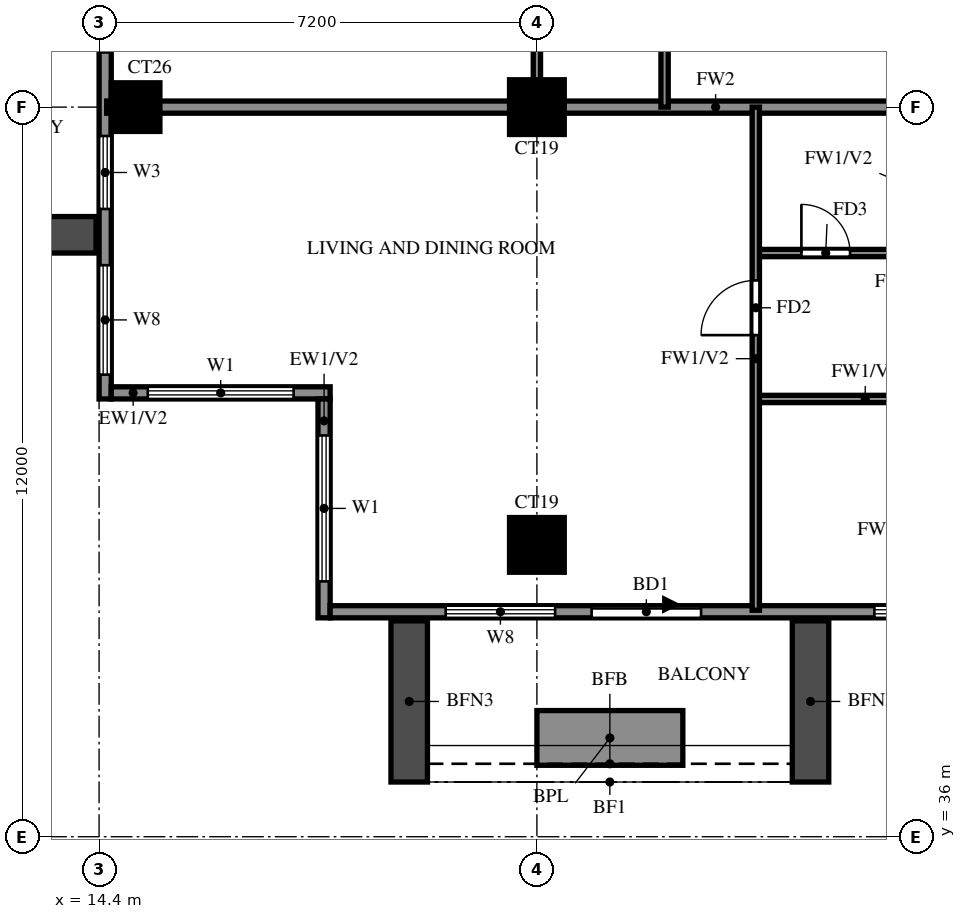
"""IFC4 building model, lengths in metres.
Left out: names, types, materials, properties, quantities, classifications, styles, units other than length and angle.
Written with IfcOpenShell. Run it as: python <this file> out.ifc"""

import sys

from ifc_helpers import new_model, si_unit, direction, frame, frame_2d, origin, origin_2d, place, context, subcontext, project, spatial, rectangle, extrude, source, transform, mapped, element, fill, save


model = new_model("IFC4")
c1 = context("Model", 3, precision=1e-05, world=origin(), true_north=direction((0.0, 1.0)))
c2 = subcontext(c1, "Body", "Model", "MODEL_VIEW")
j1 = project(units=[si_unit("LENGTHUNIT", "METRE"), si_unit("PLANEANGLEUNIT", "RADIAN")], contexts=[c1])
p1 = place(None, origin())
s1 = spatial("IfcSite", under=j1, at=p1, CompositionType="ELEMENT")
p2 = place(p1, origin())
s2 = spatial("IfcBuilding", under=s1, at=p2, CompositionType="ELEMENT")
p3 = place(p2, frame((0.0, 0.0, 192.0)))
s3 = spatial("IfcBuildingStorey", under=s2, at=p3, CompositionType="ELEMENT", Elevation=192.0)
m1 = source(origin(), c2, "Body", "SweptSolid", [
    extrude(rectangle(XDim=0.9, YDim=0.9, at=origin_2d()), origin(), (0.0, 0.0, 1.0), 3.2),
])
p4 = place(p3, frame((21.6, 40.8, 0.0), z_axis=(0.0, 0.0, 1.0), x_axis=(1.0, 0.0, 0.0)))
e1 = element("IfcColumn", 1, at=p4, inside=s3, PredefinedType="COLUMN", context=c2, shape_type="MappedRepresentation", body=[
    mapped(m1, transform((0.0, 0.0, 0.0))),
])
m2 = source(origin(), c2, "Body", "SweptSolid", [
    extrude(rectangle(XDim=0.8, YDim=0.8, at=origin_2d()), origin(), (0.0, 0.0, 1.0), 3.2),
])
p5 = place(p3, frame((15.0, 48.0, 0.0), z_axis=(0.0, 0.0, 1.0), x_axis=(1.0, 0.0, 0.0)))
e2 = element("IfcColumn", 2, at=p5, inside=s3, PredefinedType="COLUMN", context=c2, shape_type="MappedRepresentation", body=[
    mapped(m2, transform((0.0, 0.0, 0.0))),
])
p6 = place(p3, frame((21.6, 48.0, 0.0), z_axis=(0.0, 0.0, 1.0), x_axis=(1.0, 0.0, 0.0)))
e3 = element("IfcColumn", 3, at=p6, inside=s3, PredefinedType="COLUMN", context=c2, shape_type="MappedRepresentation", body=[
    mapped(m1, transform((0.0, 0.0, 0.0))),
])
p7 = place(p3, frame((14.5, 76.6, 0.0), z_axis=(0.0, 0.0, 1.0), x_axis=(0.0, -1.0, 0.0)))
e4 = element("IfcWall", 4, at=p7, inside=s3, PredefinedType="SOLIDWALL", context=c2, shape_type="SweptSolid", body=[
    extrude(rectangle(XDim=33.4, YDim=0.2, at=frame_2d((16.7, 0.0))), origin(), (0.0, 0.0, 1.0), 3.2),
])
p8 = place(p7, frame((11.5, 0.0, 0.0)))
e5 = element("IfcOpeningElement", 5, at=p8, cuts=e4, PredefinedType="OPENING", context=c2, shape_type="SweptSolid", body=[
    extrude(rectangle(XDim=1.8, YDim=2.4, at=frame_2d((0.9, 1.2))), frame((0.0, 0.11, 0.0), z_axis=(0.0, -1.0, 0.0), x_axis=(1.0, 0.0, 0.0)), (0.0, 0.0, 1.0), 0.22),
])
p9 = place(p7, frame((25.9, 0.0, 0.0)))
e6 = element("IfcOpeningElement", 6, at=p9, cuts=e4, PredefinedType="OPENING", context=c2, shape_type="SweptSolid", body=[
    extrude(rectangle(XDim=1.8, YDim=2.4, at=frame_2d((0.9, 1.2))), frame((0.0, 0.11, 0.0), z_axis=(0.0, -1.0, 0.0), x_axis=(1.0, 0.0, 0.0)), (0.0, 0.0, 1.0), 0.22),
])
p10 = place(p7, frame((29.075, 0.0, 0.6)))
e7 = element("IfcOpeningElement", 7, at=p10, cuts=e4, PredefinedType="OPENING", context=c2, shape_type="SweptSolid", body=[
    extrude(rectangle(XDim=1.2, YDim=2.4, at=frame_2d((0.6, 1.2))), frame((0.0, 0.11, 0.0), z_axis=(0.0, -1.0, 0.0), x_axis=(1.0, 0.0, 0.0)), (0.0, 0.0, 1.0), 0.22),
])
p11 = place(p7, frame((31.2, 0.0, 0.6)))
e8 = element("IfcOpeningElement", 8, at=p11, cuts=e4, PredefinedType="OPENING", context=c2, shape_type="SweptSolid", body=[
    extrude(rectangle(XDim=1.8, YDim=2.4, at=frame_2d((0.9, 1.2))), frame((0.0, 0.11, 0.0), z_axis=(0.0, -1.0, 0.0), x_axis=(1.0, 0.0, 0.0)), (0.0, 0.0, 1.0), 0.22),
])
p12 = place(p7, frame((21.875, 0.0, 0.6)))
e9 = element("IfcOpeningElement", 9, at=p12, cuts=e4, PredefinedType="OPENING", context=c2, shape_type="SweptSolid", body=[
    extrude(rectangle(XDim=1.8, YDim=2.4, at=frame_2d((0.9, 1.2))), frame((0.0, 0.11, 0.0), z_axis=(0.0, -1.0, 0.0), x_axis=(1.0, 0.0, 0.0)), (0.0, 0.0, 1.0), 0.22),
])
p13 = place(p7, frame((18.225, 0.0, 0.6)))
e10 = element("IfcOpeningElement", 10, at=p13, cuts=e4, PredefinedType="OPENING", context=c2, shape_type="SweptSolid", body=[
    extrude(rectangle(XDim=2.4, YDim=2.4, at=frame_2d((1.2, 1.2))), frame((0.0, 0.11, 0.0), z_axis=(0.0, -1.0, 0.0), x_axis=(1.0, 0.0, 0.0)), (0.0, 0.0, 1.0), 0.22),
])
p14 = place(p7, frame((14.675, 0.0, 0.6)))
e11 = element("IfcOpeningElement", 11, at=p14, cuts=e4, PredefinedType="OPENING", context=c2, shape_type="SweptSolid", body=[
    extrude(rectangle(XDim=1.2, YDim=2.4, at=frame_2d((0.6, 1.2))), frame((0.0, 0.11, 0.0), z_axis=(0.0, -1.0, 0.0), x_axis=(1.0, 0.0, 0.0)), (0.0, 0.0, 1.0), 0.22),
])
p15 = place(p7, frame((16.75, 0.0, 0.6)))
e12 = element("IfcOpeningElement", 12, at=p15, cuts=e4, PredefinedType="OPENING", context=c2, shape_type="SweptSolid", body=[
    extrude(rectangle(XDim=0.9, YDim=2.4, at=frame_2d((0.45, 1.2))), frame((0.0, 0.11, 0.0), z_axis=(0.0, -1.0, 0.0), x_axis=(1.0, 0.0, 0.0)), (0.0, 0.0, 1.0), 0.22),
])
p16 = place(p7, frame((7.475, 0.0, 0.6)))
e13 = element("IfcOpeningElement", 13, at=p16, cuts=e4, PredefinedType="OPENING", context=c2, shape_type="SweptSolid", body=[
    extrude(rectangle(XDim=1.8, YDim=2.4, at=frame_2d((0.9, 1.2))), frame((0.0, 0.11, 0.0), z_axis=(0.0, -1.0, 0.0), x_axis=(1.0, 0.0, 0.0)), (0.0, 0.0, 1.0), 0.22),
])
p17 = place(p7, frame((3.825, 0.0, 0.6)))
e14 = element("IfcOpeningElement", 14, at=p17, cuts=e4, PredefinedType="OPENING", context=c2, shape_type="SweptSolid", body=[
    extrude(rectangle(XDim=2.4, YDim=2.4, at=frame_2d((1.2, 1.2))), frame((0.0, 0.11, 0.0), z_axis=(0.0, -1.0, 0.0), x_axis=(1.0, 0.0, 0.0)), (0.0, 0.0, 1.0), 0.22),
])
p18 = place(p7, frame((0.6, 0.0, 0.6)))
e15 = element("IfcOpeningElement", 15, at=p18, cuts=e4, PredefinedType="OPENING", context=c2, shape_type="SweptSolid", body=[
    extrude(rectangle(XDim=2.4, YDim=2.4, at=frame_2d((1.2, 1.2))), frame((0.0, 0.11, 0.0), z_axis=(0.0, -1.0, 0.0), x_axis=(1.0, 0.0, 0.0)), (0.0, 0.0, 1.0), 0.22),
])
p19 = place(p3, frame((14.6, 43.3, 0.0), z_axis=(0.0, 0.0, 1.0), x_axis=(1.0, 0.0, 0.0)))
e16 = element("IfcWall", 16, at=p19, inside=s3, PredefinedType="SOLIDWALL", context=c2, shape_type="SweptSolid", body=[
    extrude(rectangle(XDim=3.6, YDim=0.2, at=frame_2d((1.8, 0.0))), origin(), (0.0, 0.0, 1.0), 3.2),
])
p20 = place(p19, frame((0.6, 0.0, 0.6)))
e17 = element("IfcOpeningElement", 17, at=p20, cuts=e16, PredefinedType="OPENING", context=c2, shape_type="SweptSolid", body=[
    extrude(rectangle(XDim=2.4, YDim=2.4, at=frame_2d((1.2, 1.2))), frame((0.0, 0.11, 0.0), z_axis=(0.0, -1.0, 0.0), x_axis=(1.0, 0.0, 0.0)), (0.0, 0.0, 1.0), 0.22),
])
p21 = place(p3, frame((18.1, 43.2, 0.0), z_axis=(0.0, 0.0, 1.0), x_axis=(0.0, -1.0, 0.0)))
e18 = element("IfcWall", 18, at=p21, inside=s3, PredefinedType="SOLIDWALL", context=c2, shape_type="SweptSolid", body=[
    extrude(rectangle(XDim=3.6, YDim=0.2, at=frame_2d((1.8, 0.0))), origin(), (0.0, 0.0, 1.0), 3.2),
])
p22 = place(p21, frame((0.6, 0.0, 0.6)))
e19 = element("IfcOpeningElement", 19, at=p22, cuts=e18, PredefinedType="OPENING", context=c2, shape_type="SweptSolid", body=[
    extrude(rectangle(XDim=2.4, YDim=2.4, at=frame_2d((1.2, 1.2))), frame((0.0, 0.11, 0.0), z_axis=(0.0, -1.0, 0.0), x_axis=(1.0, 0.0, 0.0)), (0.0, 0.0, 1.0), 0.22),
])
p23 = place(p3, frame((18.2, 39.7, 0.0), z_axis=(0.0, 0.0, 1.0), x_axis=(1.0, 0.0, 0.0)))
e20 = element("IfcWall", 20, at=p23, inside=s3, PredefinedType="SOLIDWALL", context=c2, shape_type="SweptSolid", body=[
    extrude(rectangle(XDim=23.8, YDim=0.2, at=frame_2d((11.9, 0.0))), origin(), (0.0, 0.0, 1.0), 3.2),
])
p24 = place(p23, frame((4.3, 0.0, 0.0)))
e21 = element("IfcOpeningElement", 21, at=p24, cuts=e20, PredefinedType="OPENING", context=c2, shape_type="SweptSolid", body=[
    extrude(rectangle(XDim=1.8, YDim=2.4, at=frame_2d((0.9, 1.2))), frame((0.0, 0.11, 0.0), z_axis=(0.0, -1.0, 0.0), x_axis=(1.0, 0.0, 0.0)), (0.0, 0.0, 1.0), 0.22),
])
p25 = place(p23, frame((1.9, 0.0, 0.6)))
e22 = element("IfcOpeningElement", 22, at=p25, cuts=e20, PredefinedType="OPENING", context=c2, shape_type="SweptSolid", body=[
    extrude(rectangle(XDim=1.8, YDim=2.4, at=frame_2d((0.9, 1.2))), frame((0.0, 0.11, 0.0), z_axis=(0.0, -1.0, 0.0), x_axis=(1.0, 0.0, 0.0)), (0.0, 0.0, 1.0), 0.22),
])
p26 = place(p23, frame((11.8, 0.0, 0.6)))
e23 = element("IfcOpeningElement", 23, at=p26, cuts=e20, PredefinedType="OPENING", context=c2, shape_type="SweptSolid", body=[
    extrude(rectangle(XDim=2.4, YDim=2.4, at=frame_2d((1.2, 1.2))), frame((0.0, 0.11, 0.0), z_axis=(0.0, -1.0, 0.0), x_axis=(1.0, 0.0, 0.0)), (0.0, 0.0, 1.0), 0.22),
])
p27 = place(p23, frame((8.95, 0.0, 1.5)))
e24 = element("IfcOpeningElement", 24, at=p27, cuts=e20, PredefinedType="OPENING", context=c2, shape_type="SweptSolid", body=[
    extrude(rectangle(XDim=0.9, YDim=0.9, at=frame_2d((0.45, 0.45))), frame((0.0, 0.11, 0.0), z_axis=(0.0, -1.0, 0.0), x_axis=(1.0, 0.0, 0.0)), (0.0, 0.0, 1.0), 0.22),
])
for number, where, z_axis, x_axis in (
    (25, (14.35, 45.9, 0.0), (0.0, 0.0, 1.0), (-1.0, 0.0, 0.0)),
    (26, (19.5, 39.55, 0.0), (0.0, 0.0, 1.0), (0.0, -1.0, 0.0)),
    (27, (26.1, 39.55, 0.0), (0.0, 0.0, 1.0), (0.0, -1.0, 0.0)),
):
    element("IfcWall", number, at=place(p3, frame(where, z_axis=z_axis, x_axis=x_axis)), inside=s3, PredefinedType="SOLIDWALL", context=c2, shape_type="SweptSolid", body=[
        extrude(rectangle(XDim=2.65, YDim=0.6, at=frame_2d((1.325, 0.0))), origin(), (0.0, 0.0, 1.0), 2.85),
    ])
p28 = place(p3, frame((21.6, 37.625, 0.0), z_axis=(0.0, 0.0, 1.0), x_axis=(1.0, 0.0, 0.0)))
e28 = element("IfcWall", 28, at=p28, inside=s3, PredefinedType="SOLIDWALL", context=c2, shape_type="SweptSolid", body=[
    extrude(rectangle(XDim=2.4, YDim=0.9, at=frame_2d((1.2, 0.0))), origin(), (0.0, 0.0, 1.0), 0.9),
])
p29 = place(p3, frame((14.525, 48.0, 0.0), z_axis=(0.0, 0.0, 1.0), x_axis=(1.0, 0.0, 0.0)))
e29 = element("IfcWall", 29, at=p29, inside=s3, PredefinedType="SOLIDWALL", context=c2, shape_type="SweptSolid", body=[
    extrude(rectangle(XDim=19.075, YDim=0.2, at=frame_2d((9.538, 0.0))), origin(), (0.0, 0.0, 1.0), 3.2),
])
p30 = place(p3, frame((25.2, 43.2, 0.0), z_axis=(0.0, 0.0, 1.0), x_axis=(1.0, 0.0, 0.0)))
e30 = element("IfcWall", 30, at=p30, inside=s3, PredefinedType="PARTITIONING", context=c2, shape_type="SweptSolid", body=[
    extrude(rectangle(XDim=3.6, YDim=0.12, at=frame_2d((1.8, 0.0))), origin(), (0.0, 0.0, 1.0), 3.2),
])
p31 = place(p3, frame((25.2, 45.6, 0.0), z_axis=(0.0, 0.0, 1.0), x_axis=(1.0, 0.0, 0.0)))
e31 = element("IfcWall", 31, at=p31, inside=s3, PredefinedType="PARTITIONING", context=c2, shape_type="SweptSolid", body=[
    extrude(rectangle(XDim=6.0, YDim=0.12, at=frame_2d((3.0, 0.0))), origin(), (0.0, 0.0, 1.0), 3.2),
])
p32 = place(p31, frame((0.75, 0.0, 0.0)))
e32 = element("IfcOpeningElement", 32, at=p32, cuts=e31, PredefinedType="OPENING", context=c2, shape_type="SweptSolid", body=[
    extrude(rectangle(XDim=0.8, YDim=2.1, at=frame_2d((0.4, 1.05))), frame((0.0, 0.07, 0.0), z_axis=(0.0, -1.0, 0.0), x_axis=(1.0, 0.0, 0.0)), (0.0, 0.0, 1.0), 0.14),
])
p33 = place(p31, frame((3.7, 0.0, 0.0)))
e33 = element("IfcOpeningElement", 33, at=p33, cuts=e31, PredefinedType="OPENING", context=c2, shape_type="SweptSolid", body=[
    extrude(rectangle(XDim=0.9, YDim=2.1, at=frame_2d((0.45, 1.05))), frame((0.0, 0.07, 0.0), z_axis=(0.0, -1.0, 0.0), x_axis=(1.0, 0.0, 0.0)), (0.0, 0.0, 1.0), 0.14),
])
p34 = place(p3, frame((21.6, 48.0, 0.0), z_axis=(0.0, 0.0, 1.0), x_axis=(0.0, 1.0, 0.0)))
e34 = element("IfcWall", 34, at=p34, inside=s3, PredefinedType="PARTITIONING", context=c2, shape_type="SweptSolid", body=[
    extrude(rectangle(XDim=25.2, YDim=0.12, at=frame_2d((12.6, 0.0))), origin(), (0.0, 0.0, 1.0), 3.2),
])
p35 = place(p34, frame((1.35, 0.0, 0.0)))
e35 = element("IfcOpeningElement", 35, at=p35, cuts=e34, PredefinedType="OPENING", context=c2, shape_type="SweptSolid", body=[
    extrude(rectangle(XDim=0.9, YDim=2.1, at=frame_2d((0.45, 1.05))), frame((0.0, 0.07, 0.0), z_axis=(0.0, -1.0, 0.0), x_axis=(1.0, 0.0, 0.0)), (0.0, 0.0, 1.0), 0.14),
])
p36 = place(p34, frame((4.95, 0.0, 0.0)))
e36 = element("IfcOpeningElement", 36, at=p36, cuts=e34, PredefinedType="OPENING", context=c2, shape_type="SweptSolid", body=[
    extrude(rectangle(XDim=0.9, YDim=2.1, at=frame_2d((0.45, 1.05))), frame((0.0, 0.07, 0.0), z_axis=(0.0, -1.0, 0.0), x_axis=(1.0, 0.0, 0.0)), (0.0, 0.0, 1.0), 0.14),
])
p37 = place(p34, frame((8.25, 0.0, 0.0)))
e37 = element("IfcOpeningElement", 37, at=p37, cuts=e34, PredefinedType="OPENING", context=c2, shape_type="SweptSolid", body=[
    extrude(rectangle(XDim=1.5, YDim=2.1, at=frame_2d((0.75, 1.05))), frame((0.0, 0.07, 0.0), z_axis=(0.0, -1.0, 0.0), x_axis=(1.0, 0.0, 0.0)), (0.0, 0.0, 1.0), 0.14),
])
p38 = place(p34, frame((12.15, 0.0, 0.0)))
e38 = element("IfcOpeningElement", 38, at=p38, cuts=e34, PredefinedType="OPENING", context=c2, shape_type="SweptSolid", body=[
    extrude(rectangle(XDim=0.9, YDim=2.1, at=frame_2d((0.45, 1.05))), frame((0.0, 0.07, 0.0), z_axis=(0.0, -1.0, 0.0), x_axis=(1.0, 0.0, 0.0)), (0.0, 0.0, 1.0), 0.14),
])
p39 = place(p34, frame((15.75, 0.0, 0.0)))
e39 = element("IfcOpeningElement", 39, at=p39, cuts=e34, PredefinedType="OPENING", context=c2, shape_type="SweptSolid", body=[
    extrude(rectangle(XDim=0.9, YDim=2.1, at=frame_2d((0.45, 1.05))), frame((0.0, 0.07, 0.0), z_axis=(0.0, -1.0, 0.0), x_axis=(1.0, 0.0, 0.0)), (0.0, 0.0, 1.0), 0.14),
])
p40 = place(p34, frame((19.35, 0.0, 0.0)))
e40 = element("IfcOpeningElement", 40, at=p40, cuts=e34, PredefinedType="OPENING", context=c2, shape_type="SweptSolid", body=[
    extrude(rectangle(XDim=0.9, YDim=2.1, at=frame_2d((0.45, 1.05))), frame((0.0, 0.07, 0.0), z_axis=(0.0, -1.0, 0.0), x_axis=(1.0, 0.0, 0.0)), (0.0, 0.0, 1.0), 0.14),
])
p41 = place(p34, frame((22.95, 0.0, 0.0)))
e41 = element("IfcOpeningElement", 41, at=p41, cuts=e34, PredefinedType="OPENING", context=c2, shape_type="SweptSolid", body=[
    extrude(rectangle(XDim=0.9, YDim=2.1, at=frame_2d((0.45, 1.05))), frame((0.0, 0.07, 0.0), z_axis=(0.0, -1.0, 0.0), x_axis=(1.0, 0.0, 0.0)), (0.0, 0.0, 1.0), 0.14),
])
p42 = place(p3, frame((23.7, 48.0, 0.0), z_axis=(0.0, 0.0, 1.0), x_axis=(0.0, 1.0, 0.0)))
e42 = element("IfcWall", 42, at=p42, inside=s3, PredefinedType="PARTITIONING", context=c2, shape_type="SweptSolid", body=[
    extrude(rectangle(XDim=3.6, YDim=0.12, at=frame_2d((1.8, 0.0))), origin(), (0.0, 0.0, 1.0), 3.2),
])
p43 = place(p3, frame((25.2, 39.725, 0.0), z_axis=(0.0, 0.0, 1.0), x_axis=(0.0, 1.0, 0.0)))
e43 = element("IfcWall", 43, at=p43, inside=s3, PredefinedType="PARTITIONING", context=c2, shape_type="SweptSolid", body=[
    extrude(rectangle(XDim=8.275, YDim=0.12, at=frame_2d((4.137, 0.0))), origin(), (0.0, 0.0, 1.0), 3.2),
])
p44 = place(p43, frame((4.525, 0.0, 0.0)))
e44 = element("IfcOpeningElement", 44, at=p44, cuts=e43, PredefinedType="OPENING", context=c2, shape_type="SweptSolid", body=[
    extrude(rectangle(XDim=0.9, YDim=2.1, at=frame_2d((0.45, 1.05))), frame((0.0, 0.07, 0.0), z_axis=(0.0, -1.0, 0.0), x_axis=(1.0, 0.0, 0.0)), (0.0, 0.0, 1.0), 0.14),
])
p45 = place(p10, origin())
e45 = element("IfcWindow", 45, at=p45, inside=s3, PartitioningType="SINGLE_PANEL", PredefinedType="WINDOW", context=c2, shape_type="SweptSolid", body=[
    extrude(rectangle(XDim=1.2, YDim=2.4, at=frame_2d((0.6, 1.2))), frame((0.0, 0.03, 0.0), z_axis=(0.0, -1.0, 0.0), x_axis=(1.0, 0.0, 0.0)), (0.0, 0.0, 1.0), 0.06),
])
fill(e7, e45)
p46 = place(p11, origin())
e46 = element("IfcWindow", 46, at=p46, inside=s3, PartitioningType="DOUBLE_PANEL_VERTICAL", PredefinedType="WINDOW", context=c2, shape_type="SweptSolid", body=[
    extrude(rectangle(XDim=1.8, YDim=2.4, at=frame_2d((0.9, 1.2))), frame((0.0, 0.03, 0.0), z_axis=(0.0, -1.0, 0.0), x_axis=(1.0, 0.0, 0.0)), (0.0, 0.0, 1.0), 0.06),
])
fill(e8, e46)
p47 = place(p20, origin())
e47 = element("IfcWindow", 47, at=p47, inside=s3, PartitioningType="DOUBLE_PANEL_VERTICAL", PredefinedType="WINDOW", context=c2, shape_type="SweptSolid", body=[
    extrude(rectangle(XDim=2.4, YDim=2.4, at=frame_2d((1.2, 1.2))), frame((0.0, 0.03, 0.0), z_axis=(0.0, -1.0, 0.0), x_axis=(1.0, 0.0, 0.0)), (0.0, 0.0, 1.0), 0.06),
])
fill(e17, e47)
p48 = place(p22, origin())
e48 = element("IfcWindow", 48, at=p48, inside=s3, PartitioningType="DOUBLE_PANEL_VERTICAL", PredefinedType="WINDOW", context=c2, shape_type="SweptSolid", body=[
    extrude(rectangle(XDim=2.4, YDim=2.4, at=frame_2d((1.2, 1.2))), frame((0.0, 0.03, 0.0), z_axis=(0.0, -1.0, 0.0), x_axis=(1.0, 0.0, 0.0)), (0.0, 0.0, 1.0), 0.06),
])
fill(e19, e48)
p49 = place(p24, origin())
e49 = element("IfcDoor", 49, at=p49, inside=s3, OperationType="DOUBLE_DOOR_SLIDING", PredefinedType="DOOR", context=c2, shape_type="SweptSolid", body=[
    extrude(rectangle(XDim=1.8, YDim=2.4, at=frame_2d((0.9, 1.2))), frame((0.0, 0.025, 0.0), z_axis=(0.0, -1.0, 0.0), x_axis=(1.0, 0.0, 0.0)), (0.0, 0.0, 1.0), 0.05),
])
fill(e21, e49)
p50 = place(p25, origin())
e50 = element("IfcWindow", 50, at=p50, inside=s3, PartitioningType="DOUBLE_PANEL_VERTICAL", PredefinedType="WINDOW", context=c2, shape_type="SweptSolid", body=[
    extrude(rectangle(XDim=1.8, YDim=2.4, at=frame_2d((0.9, 1.2))), frame((0.0, 0.03, 0.0), z_axis=(0.0, -1.0, 0.0), x_axis=(1.0, 0.0, 0.0)), (0.0, 0.0, 1.0), 0.06),
])
fill(e22, e50)
p51 = place(p27, origin())
e51 = element("IfcWindow", 51, at=p51, inside=s3, PartitioningType="SINGLE_PANEL", PredefinedType="WINDOW", context=c2, shape_type="SweptSolid", body=[
    extrude(rectangle(XDim=0.9, YDim=0.9, at=frame_2d((0.45, 0.45))), frame((0.0, 0.03, 0.0), z_axis=(0.0, -1.0, 0.0), x_axis=(1.0, 0.0, 0.0)), (0.0, 0.0, 1.0), 0.06),
])
fill(e24, e51)
p52 = place(p44, origin())
e52 = element("IfcDoor", 52, at=p52, inside=s3, OperationType="SINGLE_SWING_LEFT", PredefinedType="DOOR", context=c2, shape_type="SweptSolid", body=[
    extrude(rectangle(XDim=0.9, YDim=2.1, at=frame_2d((0.45, 1.05))), frame((0.0, 0.025, 0.0), z_axis=(0.0, -1.0, 0.0), x_axis=(1.0, 0.0, 0.0)), (0.0, 0.0, 1.0), 0.05),
])
fill(e44, e52)
p53 = place(p32, origin())
e53 = element("IfcDoor", 53, at=p53, inside=s3, OperationType="SINGLE_SWING_LEFT", PredefinedType="DOOR", context=c2, shape_type="SweptSolid", body=[
    extrude(rectangle(XDim=0.8, YDim=2.1, at=frame_2d((0.4, 1.05))), frame((0.0, 0.025, 0.0), z_axis=(0.0, -1.0, 0.0), x_axis=(1.0, 0.0, 0.0)), (0.0, 0.0, 1.0), 0.05),
])
fill(e32, e53)
save(model, sys.argv[1])
